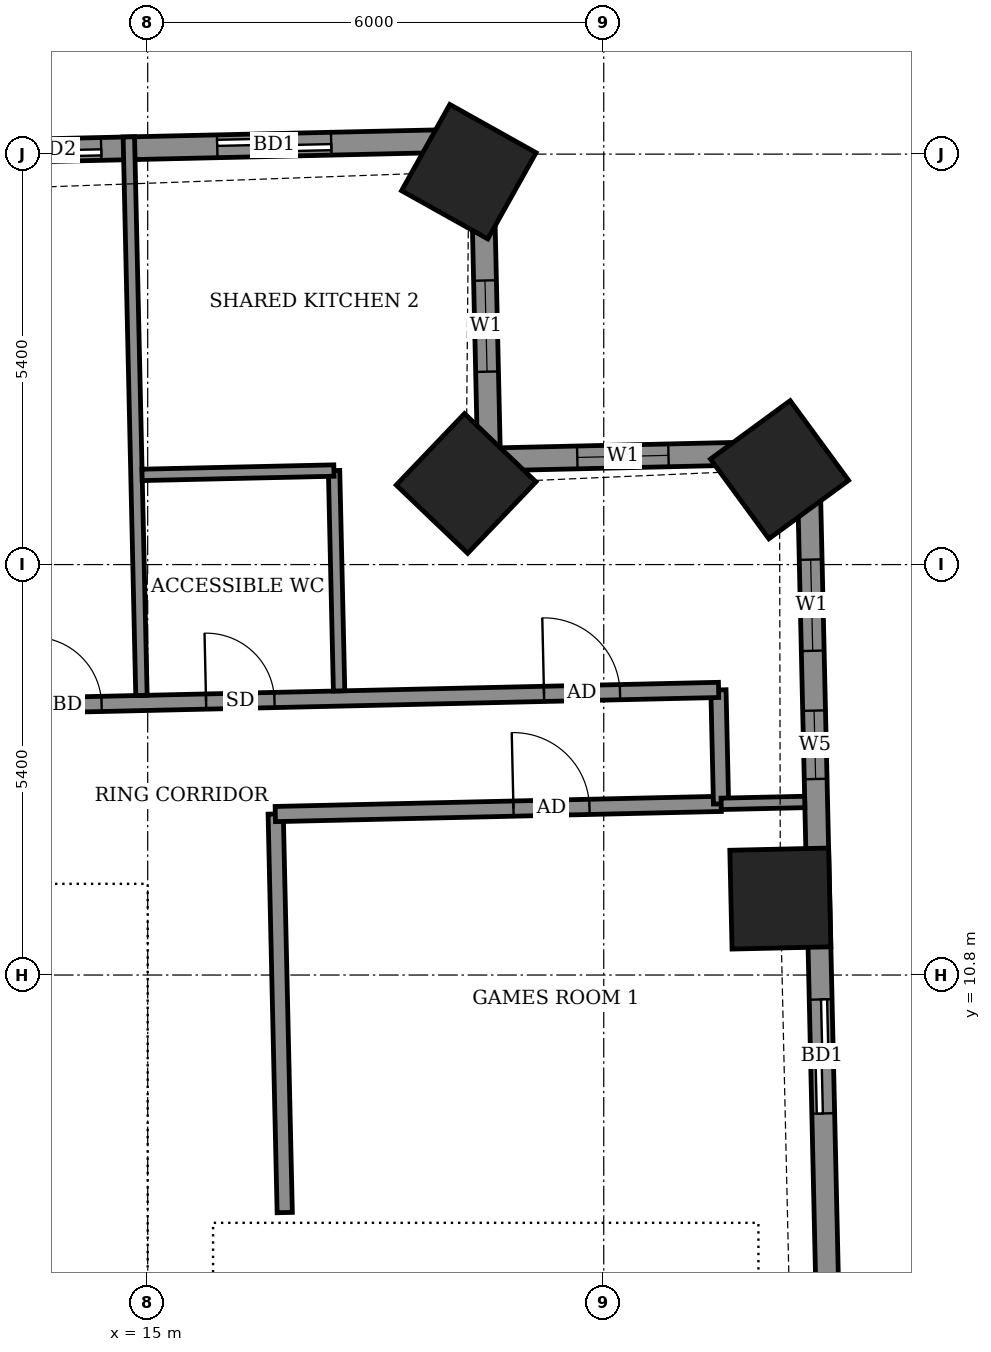
"""IFC4 building model, lengths in metres.
Left out: names, types, materials, properties, quantities, classifications, styles, units other than length and angle.
Written with IfcOpenShell. Run it as: python <this file> out.ifc"""

import sys

from ifc_helpers import new_model, si_unit, direction, frame, frame_2d, origin, origin_2d, place, context, subcontext, project, spatial, rectangle, extrude, element, fill, save


model = new_model("IFC4")
c1 = context("Model", 3, precision=1e-05, world=origin(), true_north=direction((0.0, 1.0)))
c2 = subcontext(c1, "Body", "Model", "MODEL_VIEW")
j1 = project(units=[si_unit("LENGTHUNIT", "METRE"), si_unit("PLANEANGLEUNIT", "RADIAN")], contexts=[c1])
p1 = place(None, origin())
s1 = spatial("IfcSite", under=j1, at=p1, CompositionType="ELEMENT")
p2 = place(p1, origin())
s2 = spatial("IfcBuilding", under=s1, at=p2, CompositionType="ELEMENT")
p3 = place(p2, frame((0.0, 0.0, 130.1)))
s3 = spatial("IfcBuildingStorey", under=s2, at=p3, CompositionType="ELEMENT", Elevation=130.1)
for number, where, z_axis, x_axis in (
    (1, (23.323, 11.806, -0.55), (0.0, 0.0, 1.0), (-0.023, 1.0, 0.0)),
    (2, (23.313, 17.448, -0.55), (0.0, 0.0, 1.0), (-0.591, 0.807, 0.0)),
    (3, (19.189, 17.267, -0.55), (0.0, 0.0, 1.0), (-0.723, 0.691, 0.0)),
    (4, (19.225, 21.369, -0.55), (0.0, 0.0, 1.0), (-0.873, 0.488, 0.0)),
):
    element("IfcColumn", number, at=place(p3, frame(where, z_axis=z_axis, x_axis=x_axis)), inside=s3, PredefinedType="COLUMN", context=c2, shape_type="SweptSolid", body=[
        extrude(rectangle(XDim=1.3, YDim=1.3, at=origin_2d()), origin(), (0.0, 0.0, 1.0), 3.6),
    ])
p4 = place(p3, frame((23.961, 5.752, 0.0), z_axis=(0.0, 0.0, 1.0), x_axis=(-0.022715362207, 0.999741972871, 0.0)))
e5 = element("IfcWall", 5, at=p4, inside=s3, PredefinedType="SOLIDWALL", context=c2, shape_type="SweptSolid", body=[
    extrude(rectangle(XDim=11.93, YDim=0.3, at=frame_2d((5.965, 0.0))), origin(), (0.0, 0.0, 1.0), 3.05),
])
p5 = place(p4, frame((3.228, 0.0, 0.0)))
e6 = element("IfcOpeningElement", 6, at=p5, cuts=e5, PredefinedType="OPENING", context=c2, shape_type="SweptSolid", body=[
    extrude(rectangle(XDim=1.5, YDim=2.4, at=frame_2d((0.75, 1.2))), frame((0.0, 0.16, 0.0), z_axis=(0.0, -1.0, 0.0), x_axis=(1.0, 0.0, 0.0)), (0.0, 0.0, 1.0), 0.32),
])
p6 = place(p4, frame((7.629, 0.0, 0.9)))
e7 = element("IfcOpeningElement", 7, at=p6, cuts=e5, PredefinedType="OPENING", context=c2, shape_type="SweptSolid", body=[
    extrude(rectangle(XDim=0.9, YDim=1.5, at=frame_2d((0.45, 0.75))), frame((0.0, 0.16, 0.0), z_axis=(0.0, -1.0, 0.0), x_axis=(1.0, 0.0, 0.0)), (0.0, 0.0, 1.0), 0.32),
])
p7 = place(p4, frame((9.316, 0.0, 0.9)))
e8 = element("IfcOpeningElement", 8, at=p7, cuts=e5, PredefinedType="OPENING", context=c2, shape_type="SweptSolid", body=[
    extrude(rectangle(XDim=1.2, YDim=1.5, at=frame_2d((0.6, 0.75))), frame((0.0, 0.16, 0.0), z_axis=(0.0, -1.0, 0.0), x_axis=(1.0, 0.0, 0.0)), (0.0, 0.0, 1.0), 0.32),
])
p8 = place(p3, frame((23.69, 17.679, 0.0), z_axis=(0.0, 0.0, 1.0), x_axis=(-0.999739037152, -0.022844202663, 0.0)))
e9 = element("IfcWall", 9, at=p8, inside=s3, PredefinedType="SOLIDWALL", context=c2, shape_type="SweptSolid", body=[
    extrude(rectangle(XDim=4.2, YDim=0.3, at=frame_2d((2.1, 0.0))), origin(), (0.0, 0.0, 1.0), 2.55),
])
p9 = place(p8, frame((1.839, 0.0, 0.9)))
e10 = element("IfcOpeningElement", 10, at=p9, cuts=e9, PredefinedType="OPENING", context=c2, shape_type="SweptSolid", body=[
    extrude(rectangle(XDim=1.2, YDim=1.5, at=frame_2d((0.6, 0.75))), frame((0.0, 0.16, 0.0), z_axis=(0.0, -1.0, 0.0), x_axis=(1.0, 0.0, 0.0)), (0.0, 0.0, 1.0), 0.32),
])
p10 = place(p3, frame((19.491, 17.583, 0.0), z_axis=(0.0, 0.0, 1.0), x_axis=(-0.022611811187, 0.999744320311, 0.0)))
e11 = element("IfcWall", 11, at=p10, inside=s3, PredefinedType="SOLIDWALL", context=c2, shape_type="SweptSolid", body=[
    extrude(rectangle(XDim=4.2, YDim=0.3, at=frame_2d((2.1, 0.0))), origin(), (0.0, 0.0, 1.0), 2.55),
])
p11 = place(p10, frame((1.155, 0.0, 0.9)))
e12 = element("IfcOpeningElement", 12, at=p11, cuts=e11, PredefinedType="OPENING", context=c2, shape_type="SweptSolid", body=[
    extrude(rectangle(XDim=1.2, YDim=1.5, at=frame_2d((0.6, 0.75))), frame((0.0, 0.16, 0.0), z_axis=(0.0, -1.0, 0.0), x_axis=(1.0, 0.0, 0.0)), (0.0, 0.0, 1.0), 0.32),
])
p12 = place(p3, frame((19.396, 21.782, 0.0), z_axis=(0.0, 0.0, 1.0), x_axis=(-0.999742636707, -0.022686126826, 0.0)))
e13 = element("IfcWall", 13, at=p12, inside=s3, PredefinedType="SOLIDWALL", context=c2, shape_type="SweptSolid", body=[
    extrude(rectangle(XDim=42.444, YDim=0.3, at=frame_2d((21.222, 0.0))), origin(), (0.0, 0.0, 1.0), 3.05),
])
p13 = place(p12, frame((1.982, 0.0, 0.0)))
e14 = element("IfcOpeningElement", 14, at=p13, cuts=e13, PredefinedType="OPENING", context=c2, shape_type="SweptSolid", body=[
    extrude(rectangle(XDim=1.5, YDim=2.4, at=frame_2d((0.75, 1.2))), frame((0.0, 0.16, 0.0), z_axis=(0.0, -1.0, 0.0), x_axis=(1.0, 0.0, 0.0)), (0.0, 0.0, 1.0), 0.32),
])
p14 = place(p12, frame((5.009, 0.0, 0.0)))
e15 = element("IfcOpeningElement", 15, at=p14, cuts=e13, PredefinedType="OPENING", context=c2, shape_type="SweptSolid", body=[
    extrude(rectangle(XDim=1.2, YDim=2.4, at=frame_2d((0.6, 1.2))), frame((0.0, 0.16, 0.0), z_axis=(0.0, -1.0, 0.0), x_axis=(1.0, 0.0, 0.0)), (0.0, 0.0, 1.0), 0.32),
])
p15 = place(p12, frame((10.394, 0.0, 0.0)))
e16 = element("IfcOpeningElement", 16, at=p15, cuts=e13, PredefinedType="OPENING", context=c2, shape_type="SweptSolid", body=[
    extrude(rectangle(XDim=1.5, YDim=2.4, at=frame_2d((0.75, 1.2))), frame((0.0, 0.16, 0.0), z_axis=(0.0, -1.0, 0.0), x_axis=(1.0, 0.0, 0.0)), (0.0, 0.0, 1.0), 0.32),
])
p16 = place(p12, frame((15.346, 0.0, 0.0)))
e17 = element("IfcOpeningElement", 17, at=p16, cuts=e13, PredefinedType="OPENING", context=c2, shape_type="SweptSolid", body=[
    extrude(rectangle(XDim=1.5, YDim=2.4, at=frame_2d((0.75, 1.2))), frame((0.0, 0.16, 0.0), z_axis=(0.0, -1.0, 0.0), x_axis=(1.0, 0.0, 0.0)), (0.0, 0.0, 1.0), 0.32),
])
p17 = place(p12, frame((18.508, 0.0, 0.0)))
e18 = element("IfcOpeningElement", 18, at=p17, cuts=e13, PredefinedType="OPENING", context=c2, shape_type="SweptSolid", body=[
    extrude(rectangle(XDim=1.5, YDim=2.4, at=frame_2d((0.75, 1.2))), frame((0.0, 0.16, 0.0), z_axis=(0.0, -1.0, 0.0), x_axis=(1.0, 0.0, 0.0)), (0.0, 0.0, 1.0), 0.32),
])
p18 = place(p12, frame((23.544, 0.0, 0.0)))
e19 = element("IfcOpeningElement", 19, at=p18, cuts=e13, PredefinedType="OPENING", context=c2, shape_type="SweptSolid", body=[
    extrude(rectangle(XDim=1.5, YDim=2.4, at=frame_2d((0.75, 1.2))), frame((0.0, 0.16, 0.0), z_axis=(0.0, -1.0, 0.0), x_axis=(1.0, 0.0, 0.0)), (0.0, 0.0, 1.0), 0.32),
])
p19 = place(p12, frame((29.195, 0.0, 0.0)))
e20 = element("IfcOpeningElement", 20, at=p19, cuts=e13, PredefinedType="OPENING", context=c2, shape_type="SweptSolid", body=[
    extrude(rectangle(XDim=1.5, YDim=2.4, at=frame_2d((0.75, 1.2))), frame((0.0, 0.16, 0.0), z_axis=(0.0, -1.0, 0.0), x_axis=(1.0, 0.0, 0.0)), (0.0, 0.0, 1.0), 0.32),
])
p20 = place(p12, frame((32.357, 0.0, 0.0)))
e21 = element("IfcOpeningElement", 21, at=p20, cuts=e13, PredefinedType="OPENING", context=c2, shape_type="SweptSolid", body=[
    extrude(rectangle(XDim=1.5, YDim=2.4, at=frame_2d((0.75, 1.2))), frame((0.0, 0.16, 0.0), z_axis=(0.0, -1.0, 0.0), x_axis=(1.0, 0.0, 0.0)), (0.0, 0.0, 1.0), 0.32),
])
p21 = place(p12, frame((37.524, 0.0, 0.9)))
e22 = element("IfcOpeningElement", 22, at=p21, cuts=e13, PredefinedType="OPENING", context=c2, shape_type="SweptSolid", body=[
    extrude(rectangle(XDim=2.4, YDim=1.5, at=frame_2d((1.2, 0.75))), frame((0.0, 0.16, 0.0), z_axis=(0.0, -1.0, 0.0), x_axis=(1.0, 0.0, 0.0)), (0.0, 0.0, 1.0), 0.32),
])
p22 = place(p3, frame((16.803, 7.675, 0.0), z_axis=(0.0, 0.0, 1.0), x_axis=(-0.022667483124, 0.999743059595, 0.0)))
e23 = element("IfcWall", 23, at=p22, inside=s3, PredefinedType="PARTITIONING", context=c2, shape_type="SweptSolid", body=[
    extrude(rectangle(XDim=5.245, YDim=0.2, at=frame_2d((2.623, 0.0))), origin(), (0.0, 0.0, 1.0), 3.05),
])
p23 = place(p3, frame((16.679, 12.918, 0.0), z_axis=(0.0, 0.0, 1.0), x_axis=(0.999739057042, 0.022843332181, 0.0)))
e24 = element("IfcWall", 24, at=p23, inside=s3, PredefinedType="PARTITIONING", context=c2, shape_type="SweptSolid", body=[
    extrude(rectangle(XDim=5.867, YDim=0.2, at=frame_2d((2.934, 0.0))), origin(), (0.0, 0.0, 1.0), 3.05),
])
p24 = place(p23, frame((3.134, 0.0, 0.0)))
e25 = element("IfcOpeningElement", 25, at=p24, cuts=e24, PredefinedType="OPENING", context=c2, shape_type="SweptSolid", body=[
    extrude(rectangle(XDim=1.0, YDim=2.1, at=frame_2d((0.5, 1.05))), frame((0.0, 0.11, 0.0), z_axis=(0.0, -1.0, 0.0), x_axis=(1.0, 0.0, 0.0)), (0.0, 0.0, 1.0), 0.22),
])
p25 = place(p3, frame((22.543, 13.052, 0.0), z_axis=(0.0, 0.0, 1.0), x_axis=(-0.022632637625, 0.99974384905, 0.0)))
e26 = element("IfcWall", 26, at=p25, inside=s3, PredefinedType="PARTITIONING", context=c2, shape_type="SweptSolid", body=[
    extrude(rectangle(XDim=1.5, YDim=0.2, at=frame_2d((0.75, 0.0))), origin(), (0.0, 0.0, 1.0), 3.05),
])
p26 = place(p3, frame((22.545, 13.052, 0.0), z_axis=(0.0, 0.0, 1.0), x_axis=(0.999743438074, 0.022650784248, 0.0)))
e27 = element("IfcWall", 27, at=p26, inside=s3, PredefinedType="PARTITIONING", context=c2, shape_type="SweptSolid", body=[
    extrude(rectangle(XDim=1.099, YDim=0.15, at=frame_2d((0.55, 0.0))), origin(), (0.0, 0.0, 1.0), 2.55),
])
p27 = place(p3, frame((-26.421, 13.441, 0.0), z_axis=(0.0, 0.0, 1.0), x_axis=(0.999742754064, 0.022680954485, 0.0)))
e28 = element("IfcWall", 28, at=p27, inside=s3, PredefinedType="PARTITIONING", context=c2, shape_type="SweptSolid", body=[
    extrude(rectangle(XDim=48.945, YDim=0.2, at=frame_2d((24.472, 0.0))), origin(), (0.0, 0.0, 1.0), 3.05),
])
p28 = place(p27, frame((46.647, 0.0, 0.0)))
e29 = element("IfcOpeningElement", 29, at=p28, cuts=e28, PredefinedType="OPENING", context=c2, shape_type="SweptSolid", body=[
    extrude(rectangle(XDim=1.0, YDim=2.1, at=frame_2d((0.5, 1.05))), frame((0.0, 0.11, 0.0), z_axis=(0.0, -1.0, 0.0), x_axis=(1.0, 0.0, 0.0)), (0.0, 0.0, 1.0), 0.22),
])
p29 = place(p27, frame((42.2, 0.0, 0.0)))
e30 = element("IfcOpeningElement", 30, at=p29, cuts=e28, PredefinedType="OPENING", context=c2, shape_type="SweptSolid", body=[
    extrude(rectangle(XDim=0.9, YDim=2.1, at=frame_2d((0.45, 1.05))), frame((0.0, 0.11, 0.0), z_axis=(0.0, -1.0, 0.0), x_axis=(1.0, 0.0, 0.0)), (0.0, 0.0, 1.0), 0.22),
])
p30 = place(p27, frame((39.925, 0.0, 0.0)))
e31 = element("IfcOpeningElement", 31, at=p30, cuts=e28, PredefinedType="OPENING", context=c2, shape_type="SweptSolid", body=[
    extrude(rectangle(XDim=0.9, YDim=2.1, at=frame_2d((0.45, 1.05))), frame((0.0, 0.11, 0.0), z_axis=(0.0, -1.0, 0.0), x_axis=(1.0, 0.0, 0.0)), (0.0, 0.0, 1.0), 0.22),
])
p31 = place(p27, frame((33.2, 0.0, 0.0)))
e32 = element("IfcOpeningElement", 32, at=p31, cuts=e28, PredefinedType="OPENING", context=c2, shape_type="SweptSolid", body=[
    extrude(rectangle(XDim=0.9, YDim=2.1, at=frame_2d((0.45, 1.05))), frame((0.0, 0.11, 0.0), z_axis=(0.0, -1.0, 0.0), x_axis=(1.0, 0.0, 0.0)), (0.0, 0.0, 1.0), 0.22),
])
p32 = place(p27, frame((31.25, 0.0, 0.0)))
e33 = element("IfcOpeningElement", 33, at=p32, cuts=e28, PredefinedType="OPENING", context=c2, shape_type="SweptSolid", body=[
    extrude(rectangle(XDim=0.9, YDim=2.1, at=frame_2d((0.45, 1.05))), frame((0.0, 0.11, 0.0), z_axis=(0.0, -1.0, 0.0), x_axis=(1.0, 0.0, 0.0)), (0.0, 0.0, 1.0), 0.22),
])
p33 = place(p27, frame((24.5, 0.0, 0.0)))
e34 = element("IfcOpeningElement", 34, at=p33, cuts=e28, PredefinedType="OPENING", context=c2, shape_type="SweptSolid", body=[
    extrude(rectangle(XDim=0.9, YDim=2.1, at=frame_2d((0.45, 1.05))), frame((0.0, 0.11, 0.0), z_axis=(0.0, -1.0, 0.0), x_axis=(1.0, 0.0, 0.0)), (0.0, 0.0, 1.0), 0.22),
])
p34 = place(p27, frame((22.45, 0.0, 0.0)))
e35 = element("IfcOpeningElement", 35, at=p34, cuts=e28, PredefinedType="OPENING", context=c2, shape_type="SweptSolid", body=[
    extrude(rectangle(XDim=0.9, YDim=2.1, at=frame_2d((0.45, 1.05))), frame((0.0, 0.11, 0.0), z_axis=(0.0, -1.0, 0.0), x_axis=(1.0, 0.0, 0.0)), (0.0, 0.0, 1.0), 0.22),
])
p35 = place(p27, frame((15.475, 0.0, 0.0)))
e36 = element("IfcOpeningElement", 36, at=p35, cuts=e28, PredefinedType="OPENING", context=c2, shape_type="SweptSolid", body=[
    extrude(rectangle(XDim=0.9, YDim=2.1, at=frame_2d((0.45, 1.05))), frame((0.0, 0.11, 0.0), z_axis=(0.0, -1.0, 0.0), x_axis=(1.0, 0.0, 0.0)), (0.0, 0.0, 1.0), 0.22),
])
p36 = place(p27, frame((13.4, 0.0, 0.0)))
e37 = element("IfcOpeningElement", 37, at=p36, cuts=e28, PredefinedType="OPENING", context=c2, shape_type="SweptSolid", body=[
    extrude(rectangle(XDim=0.9, YDim=2.1, at=frame_2d((0.45, 1.05))), frame((0.0, 0.11, 0.0), z_axis=(0.0, -1.0, 0.0), x_axis=(1.0, 0.0, 0.0)), (0.0, 0.0, 1.0), 0.22),
])
p37 = place(p27, frame((2.725, 0.0, 0.0)))
e38 = element("IfcOpeningElement", 38, at=p37, cuts=e28, PredefinedType="OPENING", context=c2, shape_type="SweptSolid", body=[
    extrude(rectangle(XDim=1.0, YDim=2.1, at=frame_2d((0.5, 1.05))), frame((0.0, 0.11, 0.0), z_axis=(0.0, -1.0, 0.0), x_axis=(1.0, 0.0, 0.0)), (0.0, 0.0, 1.0), 0.22),
])
p38 = place(p27, frame((8.7, 0.0, 0.0)))
e39 = element("IfcOpeningElement", 39, at=p38, cuts=e28, PredefinedType="OPENING", context=c2, shape_type="SweptSolid", body=[
    extrude(rectangle(XDim=0.9, YDim=2.1, at=frame_2d((0.45, 1.05))), frame((0.0, 0.11, 0.0), z_axis=(0.0, -1.0, 0.0), x_axis=(1.0, 0.0, 0.0)), (0.0, 0.0, 1.0), 0.22),
])
p39 = place(p3, frame((14.918, 14.479, 0.0), z_axis=(0.0, 0.0, 1.0), x_axis=(-0.022587849492, 0.99974486198, 0.0)))
e40 = element("IfcWall", 40, at=p39, inside=s3, PredefinedType="PARTITIONING", context=c2, shape_type="SweptSolid", body=[
    extrude(rectangle(XDim=7.35, YDim=0.15, at=frame_2d((3.675, 0.0))), origin(), (0.0, 0.0, 1.0), 2.55),
])
p40 = place(p3, frame((17.518, 14.538, 0.0), z_axis=(0.0, 0.0, 1.0), x_axis=(-0.022817032779, 0.999739657619, 0.0)))
e41 = element("IfcWall", 41, at=p40, inside=s3, PredefinedType="PARTITIONING", context=c2, shape_type="SweptSolid", body=[
    extrude(rectangle(XDim=2.9, YDim=0.15, at=frame_2d((1.45, 0.0))), origin(), (0.0, 0.0, 1.0), 3.05),
])
p41 = place(p3, frame((14.926, 17.38, 0.0), z_axis=(0.0, 0.0, 1.0), x_axis=(0.99974392816, 0.022629142889, 0.0)))
e42 = element("IfcWall", 42, at=p41, inside=s3, PredefinedType="PARTITIONING", context=c2, shape_type="SweptSolid", body=[
    extrude(rectangle(XDim=2.525, YDim=0.15, at=frame_2d((1.262, 0.0))), origin(), (0.0, 0.0, 1.0), 3.05),
])
p42 = place(p3, frame((-14.8, 11.3, 0.0), z_axis=(0.0, 0.0, 1.0), x_axis=(1.0, 0.0, 0.0)))
e43 = element("IfcWall", 43, at=p42, inside=s3, PredefinedType="SHEAR", context=c2, shape_type="SweptSolid", body=[
    extrude(rectangle(XDim=29.6, YDim=1.0, at=frame_2d((14.8, 0.0))), origin(), (0.0, 0.0, 1.0), 3.6),
])
p43 = place(p3, frame((14.3, -10.8, 0.0), z_axis=(0.0, 0.0, 1.0), x_axis=(0.0, 1.0, 0.0)))
e44 = element("IfcWall", 44, at=p43, inside=s3, PredefinedType="SHEAR", context=c2, shape_type="SweptSolid", body=[
    extrude(rectangle(XDim=21.6, YDim=1.0, at=frame_2d((10.8, 0.0))), origin(), (0.0, 0.0, 1.0), 3.6),
])
p44 = place(p43, frame((1.2, 0.0, 0.0)))
e45 = element("IfcOpeningElement", 45, at=p44, cuts=e44, PredefinedType="OPENING", context=c2, shape_type="SweptSolid", body=[
    extrude(rectangle(XDim=1.2, YDim=2.1, at=frame_2d((0.6, 1.05))), frame((0.0, 0.51, 0.0), z_axis=(0.0, -1.0, 0.0), x_axis=(1.0, 0.0, 0.0)), (0.0, 0.0, 1.0), 1.02),
])
p45 = place(p5, origin())
e46 = element("IfcDoor", 46, at=p45, inside=s3, OperationType="SLIDING_TO_LEFT", PredefinedType="DOOR", context=c2, shape_type="SweptSolid", body=[
    extrude(rectangle(XDim=1.5, YDim=2.4, at=frame_2d((0.75, 1.2))), frame((0.0, 0.025, 0.0), z_axis=(0.0, -1.0, 0.0), x_axis=(1.0, 0.0, 0.0)), (0.0, 0.0, 1.0), 0.05),
])
fill(e6, e46)
p46 = place(p6, origin())
e47 = element("IfcWindow", 47, at=p46, inside=s3, PartitioningType="SINGLE_PANEL", PredefinedType="WINDOW", context=c2, shape_type="SweptSolid", body=[
    extrude(rectangle(XDim=0.9, YDim=1.5, at=frame_2d((0.45, 0.75))), frame((0.0, 0.03, 0.0), z_axis=(0.0, -1.0, 0.0), x_axis=(1.0, 0.0, 0.0)), (0.0, 0.0, 1.0), 0.06),
])
fill(e7, e47)
p47 = place(p7, origin())
e48 = element("IfcWindow", 48, at=p47, inside=s3, PartitioningType="SINGLE_PANEL", PredefinedType="WINDOW", context=c2, shape_type="SweptSolid", body=[
    extrude(rectangle(XDim=1.2, YDim=1.5, at=frame_2d((0.6, 0.75))), frame((0.0, 0.03, 0.0), z_axis=(0.0, -1.0, 0.0), x_axis=(1.0, 0.0, 0.0)), (0.0, 0.0, 1.0), 0.06),
])
fill(e8, e48)
p48 = place(p9, origin())
e49 = element("IfcWindow", 49, at=p48, inside=s3, PartitioningType="SINGLE_PANEL", PredefinedType="WINDOW", context=c2, shape_type="SweptSolid", body=[
    extrude(rectangle(XDim=1.2, YDim=1.5, at=frame_2d((0.6, 0.75))), frame((0.0, 0.03, 0.0), z_axis=(0.0, -1.0, 0.0), x_axis=(1.0, 0.0, 0.0)), (0.0, 0.0, 1.0), 0.06),
])
fill(e10, e49)
p49 = place(p11, origin())
e50 = element("IfcWindow", 50, at=p49, inside=s3, PartitioningType="SINGLE_PANEL", PredefinedType="WINDOW", context=c2, shape_type="SweptSolid", body=[
    extrude(rectangle(XDim=1.2, YDim=1.5, at=frame_2d((0.6, 0.75))), frame((0.0, 0.03, 0.0), z_axis=(0.0, -1.0, 0.0), x_axis=(1.0, 0.0, 0.0)), (0.0, 0.0, 1.0), 0.06),
])
fill(e12, e50)
p50 = place(p13, origin())
e51 = element("IfcDoor", 51, at=p50, inside=s3, OperationType="SLIDING_TO_LEFT", PredefinedType="DOOR", context=c2, shape_type="SweptSolid", body=[
    extrude(rectangle(XDim=1.5, YDim=2.4, at=frame_2d((0.75, 1.2))), frame((0.0, 0.025, 0.0), z_axis=(0.0, -1.0, 0.0), x_axis=(1.0, 0.0, 0.0)), (0.0, 0.0, 1.0), 0.05),
])
fill(e14, e51)
p51 = place(p14, origin())
e52 = element("IfcDoor", 52, at=p51, inside=s3, OperationType="SLIDING_TO_LEFT", PredefinedType="DOOR", context=c2, shape_type="SweptSolid", body=[
    extrude(rectangle(XDim=1.2, YDim=2.4, at=frame_2d((0.6, 1.2))), frame((0.0, 0.025, 0.0), z_axis=(0.0, -1.0, 0.0), x_axis=(1.0, 0.0, 0.0)), (0.0, 0.0, 1.0), 0.05),
])
fill(e15, e52)
p52 = place(p24, origin())
e53 = element("IfcDoor", 53, at=p52, inside=s3, OperationType="SINGLE_SWING_LEFT", PredefinedType="DOOR", context=c2, shape_type="SweptSolid", body=[
    extrude(rectangle(XDim=1.0, YDim=2.1, at=frame_2d((0.5, 1.05))), frame((0.0, 0.025, 0.0), z_axis=(0.0, -1.0, 0.0), x_axis=(1.0, 0.0, 0.0)), (0.0, 0.0, 1.0), 0.05),
])
fill(e25, e53)
p53 = place(p28, origin())
e54 = element("IfcDoor", 54, at=p53, inside=s3, OperationType="SINGLE_SWING_RIGHT", PredefinedType="DOOR", context=c2, shape_type="SweptSolid", body=[
    extrude(rectangle(XDim=1.0, YDim=2.1, at=frame_2d((0.5, 1.05))), frame((0.0, 0.025, 0.0), z_axis=(0.0, -1.0, 0.0), x_axis=(1.0, 0.0, 0.0)), (0.0, 0.0, 1.0), 0.05),
])
fill(e29, e54)
p54 = place(p29, origin())
e55 = element("IfcDoor", 55, at=p54, inside=s3, OperationType="SINGLE_SWING_LEFT", PredefinedType="DOOR", context=c2, shape_type="SweptSolid", body=[
    extrude(rectangle(XDim=0.9, YDim=2.1, at=frame_2d((0.45, 1.05))), frame((0.0, 0.025, 0.0), z_axis=(0.0, -1.0, 0.0), x_axis=(1.0, 0.0, 0.0)), (0.0, 0.0, 1.0), 0.05),
])
fill(e30, e55)
p55 = place(p30, origin())
e56 = element("IfcDoor", 56, at=p55, inside=s3, OperationType="SINGLE_SWING_LEFT", PredefinedType="DOOR", context=c2, shape_type="SweptSolid", body=[
    extrude(rectangle(XDim=0.9, YDim=2.1, at=frame_2d((0.45, 1.05))), frame((0.0, 0.025, 0.0), z_axis=(0.0, -1.0, 0.0), x_axis=(1.0, 0.0, 0.0)), (0.0, 0.0, 1.0), 0.05),
])
fill(e31, e56)
save(model, sys.argv[1])
